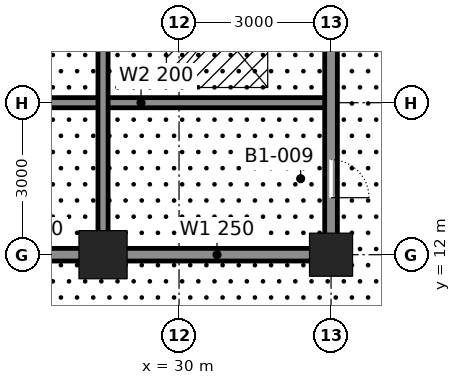
"""IFC4 building model, lengths in metres.
Left out: names, types, materials, properties, quantities, classifications, styles, units other than length and angle.
Written with IfcOpenShell. Run it as: python <this file> out.ifc"""

import sys

from ifc_helpers import new_model, si_unit, direction, frame, frame_2d, origin, origin_2d, place, context, subcontext, project, spatial, rectangle, hollow_rectangle, extrude, element, fill, save


model = new_model("IFC4")
c1 = context("Model", 3, precision=1e-05, world=origin(), true_north=direction((0.0, 1.0)))
c2 = subcontext(c1, "Body", "Model", "MODEL_VIEW")
j1 = project(units=[si_unit("LENGTHUNIT", "METRE"), si_unit("PLANEANGLEUNIT", "RADIAN")], contexts=[c1])
p1 = place(None, origin())
s1 = spatial("IfcSite", under=j1, at=p1, CompositionType="ELEMENT")
p2 = place(p1, origin())
s2 = spatial("IfcBuilding", under=s1, at=p2, CompositionType="ELEMENT")
p3 = place(p2, frame((0.0, 0.0, -5.0)))
s3 = spatial("IfcBuildingStorey", under=s2, at=p3, CompositionType="ELEMENT", Elevation=-5.0)
p4 = place(p3, frame((28.5, 12.0, -0.3), z_axis=(0.0, 0.0, 1.0), x_axis=(1.0, 0.0, 0.0)))
e1 = element("IfcColumn", 1, at=p4, inside=s3, PredefinedType="COLUMN", context=c2, shape_type="SweptSolid", body=[
    extrude(hollow_rectangle(XDim=0.95, YDim=0.95, WallThickness=0.095, at=origin_2d()), origin(), (0.0, 0.0, 1.0), 5.3),
])
p5 = place(p3, frame((33.0, 12.0, -0.3), z_axis=(0.0, 0.0, 1.0), x_axis=(1.0, 0.0, 0.0)))
e2 = element("IfcColumn", 2, at=p5, inside=s3, PredefinedType="COLUMN", context=c2, shape_type="SweptSolid", body=[
    extrude(hollow_rectangle(XDim=0.85, YDim=0.85, WallThickness=0.085, at=origin_2d()), origin(), (0.0, 0.0, 1.0), 5.3),
])
p6 = place(p3, frame((25.75, 12.0, 0.0), z_axis=(0.0, 0.0, 1.0), x_axis=(1.0, 0.0, 0.0)))
e3 = element("IfcWall", 3, at=p6, inside=s3, PredefinedType="SOLIDWALL", context=c2, shape_type="SweptSolid", body=[
    extrude(rectangle(XDim=2.5, YDim=0.25, at=frame_2d((1.25, 0.0))), origin(), (0.0, 0.0, 1.0), 3.941),
])
p7 = place(p3, frame((28.75, 12.0, 0.0), z_axis=(0.0, 0.0, 1.0), x_axis=(1.0, 0.0, 0.0)))
e4 = element("IfcWall", 4, at=p7, inside=s3, PredefinedType="SOLIDWALL", context=c2, shape_type="SweptSolid", body=[
    extrude(rectangle(XDim=4.0, YDim=0.25, at=frame_2d((2.0, 0.0))), origin(), (0.0, 0.0, 1.0), 3.941),
])
p8 = place(p3, frame((25.5, 15.0, 0.0), z_axis=(0.0, 0.0, 1.0), x_axis=(1.0, 0.0, 0.0)))
e5 = element("IfcWall", 5, at=p8, inside=s3, PredefinedType="SOLIDWALL", context=c2, shape_type="SweptSolid", body=[
    extrude(rectangle(XDim=7.5, YDim=0.2, at=frame_2d((3.75, 0.0))), origin(), (0.0, 0.0, 1.0), 4.8),
])
p9 = place(p3, frame((28.5, 12.25, 0.0), z_axis=(0.0, 0.0, 1.0), x_axis=(0.0, 1.0, 0.0)))
e6 = element("IfcWall", 6, at=p9, inside=s3, PredefinedType="SOLIDWALL", context=c2, shape_type="SweptSolid", body=[
    extrude(rectangle(XDim=8.5, YDim=0.2, at=frame_2d((4.25, 0.0))), origin(), (0.0, 0.0, 1.0), 3.873),
])
p10 = place(p3, frame((33.0, 12.25, 0.0), z_axis=(0.0, 0.0, 1.0), x_axis=(0.0, 1.0, 0.0)))
e7 = element("IfcWall", 7, at=p10, inside=s3, PredefinedType="SOLIDWALL", context=c2, shape_type="SweptSolid", body=[
    extrude(rectangle(XDim=8.5, YDim=0.25, at=frame_2d((4.25, 0.0))), origin(), (0.0, 0.0, 1.0), 3.873),
])
p11 = place(p10, frame((6.65, 0.0, 0.0)))
e8 = element("IfcOpeningElement", 8, at=p11, cuts=e7, PredefinedType="OPENING", context=c2, shape_type="SweptSolid", body=[
    extrude(rectangle(XDim=1.2, YDim=2.1, at=frame_2d((0.6, 1.05))), frame((0.0, 0.135, 0.0), z_axis=(0.0, -1.0, 0.0), x_axis=(1.0, 0.0, 0.0)), (0.0, 0.0, 1.0), 0.27),
])
p12 = place(p10, frame((0.875, 0.0, 0.0)))
e9 = element("IfcOpeningElement", 9, at=p12, cuts=e7, PredefinedType="OPENING", context=c2, shape_type="SweptSolid", body=[
    extrude(rectangle(XDim=0.75, YDim=2.1, at=frame_2d((0.375, 1.05))), frame((0.0, 0.135, 0.0), z_axis=(0.0, -1.0, 0.0), x_axis=(1.0, 0.0, 0.0)), (0.0, 0.0, 1.0), 0.27),
])
p13 = place(p12, frame((0.75, 0.0, 0.0), z_axis=(0.0, 0.0, 1.0), x_axis=(-1.0, 0.0, 0.0)))
e10 = element("IfcDoor", 10, at=p13, inside=s3, OperationType="SINGLE_SWING_RIGHT", PredefinedType="DOOR", context=c2, shape_type="SweptSolid", body=[
    extrude(rectangle(XDim=0.75, YDim=2.1, at=frame_2d((0.375, 1.05))), frame((0.0, 0.025, 0.0), z_axis=(0.0, -1.0, 0.0), x_axis=(1.0, 0.0, 0.0)), (0.0, 0.0, 1.0), 0.05),
])
fill(e9, e10)
save(model, sys.argv[1])
